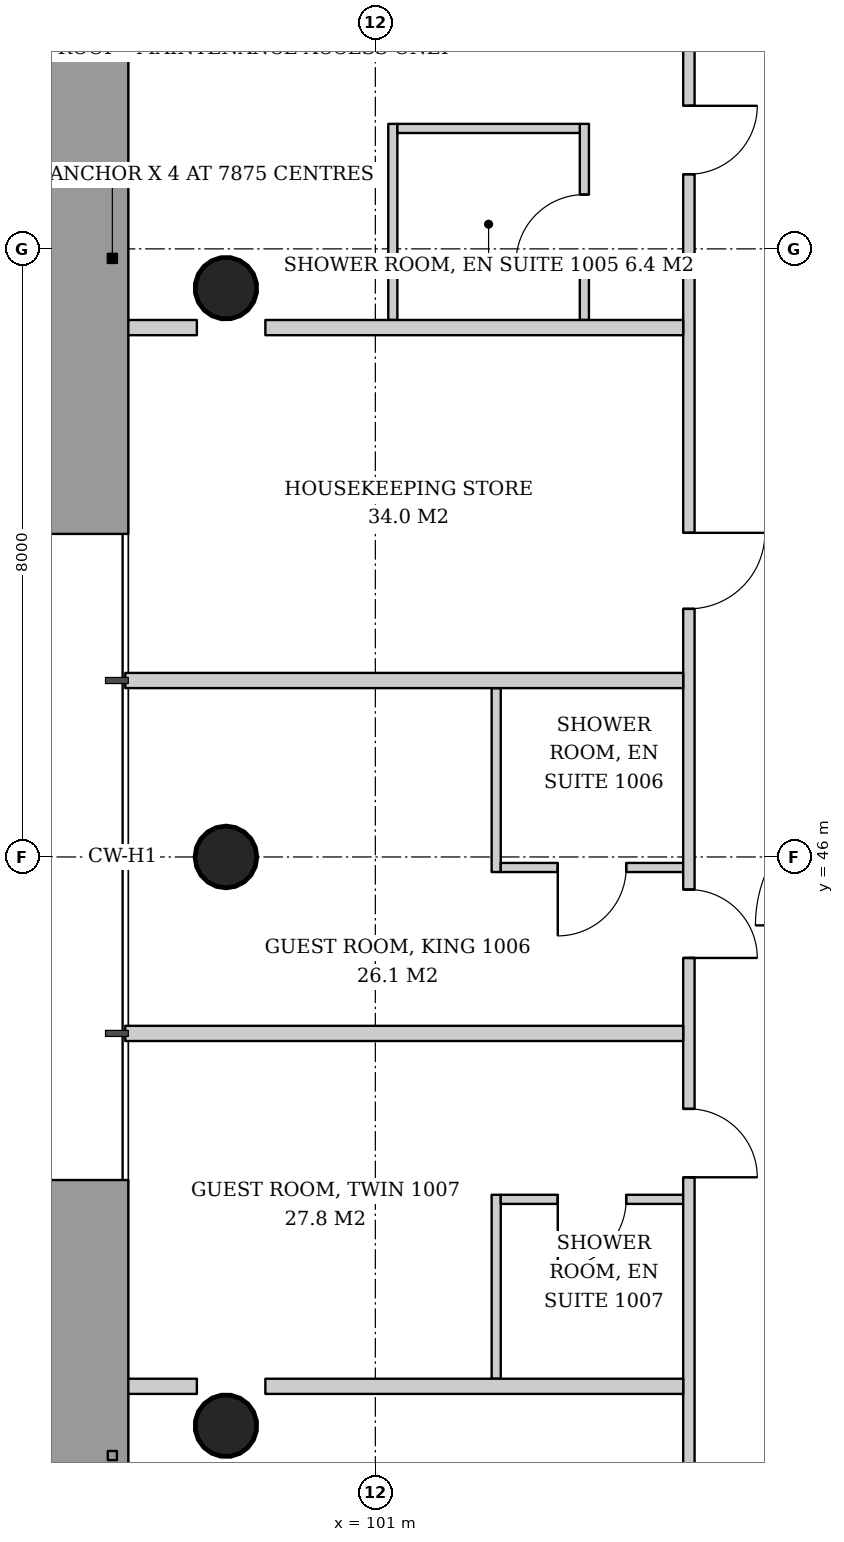
"""IFC4 building model, lengths in metres.
Left out: names, types, materials, properties, quantities, classifications, styles, units other than length and angle.
Written with IfcOpenShell. Run it as: python <this file> out.ifc"""

import sys

from ifc_helpers import new_model, si_unit, direction, frame, frame_2d, origin, origin_2d, place, context, subcontext, project, spatial, rectangle, hollow_circle, extrude, element, fill, save


model = new_model("IFC4")
c1 = context("Model", 3, precision=1e-05, world=origin(), true_north=direction((0.0, 1.0)))
c2 = subcontext(c1, "Body", "Model", "MODEL_VIEW")
j1 = project(units=[si_unit("LENGTHUNIT", "METRE"), si_unit("PLANEANGLEUNIT", "RADIAN")], contexts=[c1])
p1 = place(None, origin())
s1 = spatial("IfcSite", under=j1, at=p1, CompositionType="ELEMENT")
p2 = place(p1, origin())
s2 = spatial("IfcBuilding", under=s1, at=p2, CompositionType="ELEMENT")
p3 = place(p2, frame((0.0, 0.0, 43.8)))
s3 = spatial("IfcBuildingStorey", under=s2, at=p3, CompositionType="ELEMENT", Elevation=43.8)
p4 = place(p3, frame((98.983, 53.509, 0.0), z_axis=(0.043059584825, -0.021497706284, 0.998841188968), x_axis=(0.446680166538, 0.894693706707, 0.0)))
e1 = element("IfcColumn", 1, at=p4, inside=s3, PredefinedType="COLUMN", context=c2, shape_type="SweptSolid", body=[
    extrude(hollow_circle(Radius=0.406, WallThickness=0.03, at=origin_2d()), origin(), (0.0, 0.0, 1.0), 3.804),
])
p5 = place(p3, frame((98.983, 46.0, 0.0), z_axis=(0.043069538298, 0.0, 0.999072076915), x_axis=(0.0, 1.0, 0.0)))
e2 = element("IfcColumn", 2, at=p5, inside=s3, PredefinedType="COLUMN", context=c2, shape_type="SweptSolid", body=[
    extrude(hollow_circle(Radius=0.406, WallThickness=0.03, at=origin_2d()), origin(), (0.0, 0.0, 1.0), 3.803),
])
p6 = place(p3, frame((98.983, 38.491, 0.0), z_axis=(0.043059584825, 0.021497706284, 0.998841188968), x_axis=(-0.446680166538, 0.894693706707, 0.0)))
e3 = element("IfcColumn", 3, at=p6, inside=s3, PredefinedType="COLUMN", context=c2, shape_type="SweptSolid", body=[
    extrude(hollow_circle(Radius=0.406, WallThickness=0.03, at=origin_2d()), origin(), (0.0, 0.0, 1.0), 3.804),
])
p7 = place(p3, frame((103.75, 53.064, 0.0), z_axis=(0.0, 0.0, 1.0), x_axis=(0.0, 1.0, 0.0)))
e4 = element("IfcWall", 4, at=p7, inside=s3, PredefinedType="PARTITIONING", context=c2, shape_type="SweptSolid", body=[
    extrude(rectangle(XDim=2.58, YDim=0.12, at=frame_2d((1.29, 0.0))), origin(), (0.0, 0.0, 1.0), 2.8),
])
p8 = place(p7, frame((0.75, 0.0, 0.0)))
e5 = element("IfcOpeningElement", 5, at=p8, cuts=e4, PredefinedType="OPENING", context=c2, shape_type="SweptSolid", body=[
    extrude(rectangle(XDim=0.9, YDim=2.1, at=frame_2d((0.45, 1.05))), frame((0.0, 0.07, 0.0), z_axis=(0.0, -1.0, 0.0), x_axis=(1.0, 0.0, 0.0)), (0.0, 0.0, 1.0), 0.14),
])
p9 = place(p3, frame((101.23, 53.064, 0.0), z_axis=(0.0, 0.0, 1.0), x_axis=(0.0, 1.0, 0.0)))
e6 = element("IfcWall", 6, at=p9, inside=s3, PredefinedType="PARTITIONING", context=c2, shape_type="SweptSolid", body=[
    extrude(rectangle(XDim=2.58, YDim=0.12, at=frame_2d((1.29, 0.0))), origin(), (0.0, 0.0, 1.0), 2.8),
])
p10 = place(p3, frame((103.69, 55.584, 0.0), z_axis=(0.0, 0.0, 1.0), x_axis=(-1.0, 0.0, 0.0)))
e7 = element("IfcWall", 7, at=p10, inside=s3, PredefinedType="PARTITIONING", context=c2, shape_type="SweptSolid", body=[
    extrude(rectangle(XDim=2.4, YDim=0.12, at=frame_2d((1.2, 0.0))), origin(), (0.0, 0.0, 1.0), 2.847),
])
p11 = place(p3, frame((102.59, 48.221, 0.0), z_axis=(0.0, 0.0, 1.0), x_axis=(0.0, -1.0, 0.0)))
e8 = element("IfcWall", 8, at=p11, inside=s3, PredefinedType="PARTITIONING", context=c2, shape_type="SweptSolid", body=[
    extrude(rectangle(XDim=2.42, YDim=0.12, at=frame_2d((1.21, 0.0))), origin(), (0.0, 0.0, 1.0), 2.847),
])
p12 = place(p3, frame((105.05, 45.861, 0.0), z_axis=(0.0, 0.0, 1.0), x_axis=(-1.0, 0.0, 0.0)))
e9 = element("IfcWall", 9, at=p12, inside=s3, PredefinedType="PARTITIONING", context=c2, shape_type="SweptSolid", body=[
    extrude(rectangle(XDim=2.4, YDim=0.12, at=frame_2d((1.2, 0.0))), origin(), (0.0, 0.0, 1.0), 3.6),
])
p13 = place(p12, frame((0.75, 0.0, 0.0)))
e10 = element("IfcOpeningElement", 10, at=p13, cuts=e9, PredefinedType="OPENING", context=c2, shape_type="SweptSolid", body=[
    extrude(rectangle(XDim=0.9, YDim=2.1, at=frame_2d((0.45, 1.05))), frame((0.0, 0.07, 0.0), z_axis=(0.0, -1.0, 0.0), x_axis=(1.0, 0.0, 0.0)), (0.0, 0.0, 1.0), 0.14),
])
p14 = place(p3, frame((102.59, 41.556, 0.0), z_axis=(0.0, 0.0, 1.0), x_axis=(0.0, -1.0, 0.0)))
e11 = element("IfcWall", 11, at=p14, inside=s3, PredefinedType="PARTITIONING", context=c2, shape_type="SweptSolid", body=[
    extrude(rectangle(XDim=2.42, YDim=0.12, at=frame_2d((1.21, 0.0))), origin(), (0.0, 0.0, 1.0), 2.847),
])
p15 = place(p3, frame((105.05, 41.496, 0.0), z_axis=(0.0, 0.0, 1.0), x_axis=(-1.0, 0.0, 0.0)))
e12 = element("IfcWall", 12, at=p15, inside=s3, PredefinedType="PARTITIONING", context=c2, shape_type="SweptSolid", body=[
    extrude(rectangle(XDim=2.4, YDim=0.12, at=frame_2d((1.2, 0.0))), origin(), (0.0, 0.0, 1.0), 2.847),
])
p16 = place(p15, frame((0.75, 0.0, 0.0)))
e13 = element("IfcOpeningElement", 13, at=p16, cuts=e12, PredefinedType="OPENING", context=c2, shape_type="SweptSolid", body=[
    extrude(rectangle(XDim=0.9, YDim=2.1, at=frame_2d((0.45, 1.05))), frame((0.0, 0.07, 0.0), z_axis=(0.0, -1.0, 0.0), x_axis=(1.0, 0.0, 0.0)), (0.0, 0.0, 1.0), 0.14),
])
p17 = place(p3, frame((105.125, 57.95, 0.0), z_axis=(0.0, 0.0, 1.0), x_axis=(0.0, -1.0, 0.0)))
e14 = element("IfcWall", 14, at=p17, inside=s3, PredefinedType="PARTITIONING", context=c2, shape_type="SweptSolid", body=[
    extrude(rectangle(XDim=23.75, YDim=0.15, at=frame_2d((11.875, 0.0))), origin(), (0.0, 0.0, 1.0), 2.8),
])
p18 = place(p17, frame((2.068, 0.0, 0.0)))
e15 = element("IfcOpeningElement", 15, at=p18, cuts=e14, PredefinedType="OPENING", context=c2, shape_type="SweptSolid", body=[
    extrude(rectangle(XDim=0.9, YDim=2.1, at=frame_2d((0.45, 1.05))), frame((0.0, 0.085, 0.0), z_axis=(0.0, -1.0, 0.0), x_axis=(1.0, 0.0, 0.0)), (0.0, 0.0, 1.0), 0.17),
])
p19 = place(p17, frame((7.686, 0.0, 0.0)))
e16 = element("IfcOpeningElement", 16, at=p19, cuts=e14, PredefinedType="OPENING", context=c2, shape_type="SweptSolid", body=[
    extrude(rectangle(XDim=1.0, YDim=2.1, at=frame_2d((0.5, 1.05))), frame((0.0, 0.085, 0.0), z_axis=(0.0, -1.0, 0.0), x_axis=(1.0, 0.0, 0.0)), (0.0, 0.0, 1.0), 0.17),
])
p20 = place(p17, frame((12.379, 0.0, 0.0)))
e17 = element("IfcOpeningElement", 17, at=p20, cuts=e14, PredefinedType="OPENING", context=c2, shape_type="SweptSolid", body=[
    extrude(rectangle(XDim=0.9, YDim=2.1, at=frame_2d((0.45, 1.05))), frame((0.0, 0.085, 0.0), z_axis=(0.0, -1.0, 0.0), x_axis=(1.0, 0.0, 0.0)), (0.0, 0.0, 1.0), 0.17),
])
p21 = place(p17, frame((15.264, 0.0, 0.0)))
e18 = element("IfcOpeningElement", 18, at=p21, cuts=e14, PredefinedType="OPENING", context=c2, shape_type="SweptSolid", body=[
    extrude(rectangle(XDim=0.9, YDim=2.1, at=frame_2d((0.45, 1.05))), frame((0.0, 0.085, 0.0), z_axis=(0.0, -1.0, 0.0), x_axis=(1.0, 0.0, 0.0)), (0.0, 0.0, 1.0), 0.17),
])
p22 = place(p3, frame((105.05, 52.964, 0.0), z_axis=(0.0, 0.0, 1.0), x_axis=(-1.0, 0.0, 0.0)))
e19 = element("IfcWall", 19, at=p22, inside=s3, PredefinedType="PARTITIONING", context=c2, shape_type="SweptSolid", body=[
    extrude(rectangle(XDim=5.497, YDim=0.2, at=frame_2d((2.749, 0.0))), origin(), (0.0, 0.0, 1.0), 3.6),
])
p23 = place(p3, frame((98.652, 52.964, 0.0), z_axis=(0.0, 0.0, 1.0), x_axis=(-1.0, 0.0, 0.0)))
e20 = element("IfcWall", 20, at=p23, inside=s3, PredefinedType="PARTITIONING", context=c2, shape_type="SweptSolid", body=[
    extrude(rectangle(XDim=0.942, YDim=0.2, at=frame_2d((0.471, 0.0))), origin(), (0.0, 0.0, 1.0), 3.6),
])
for number, where, z_axis, x_axis in (
    (21, (105.05, 48.322, 0.0), (0.0, 0.0, 1.0), (-1.0, 0.0, 0.0)),
    (22, (105.05, 43.678, 0.0), (0.0, 0.0, 1.0), (-1.0, 0.0, 0.0)),
):
    element("IfcWall", number, at=place(p3, frame(where, z_axis=z_axis, x_axis=x_axis)), inside=s3, PredefinedType="PARTITIONING", context=c2, shape_type="SweptSolid", body=[
        extrude(rectangle(XDim=7.34, YDim=0.2, at=frame_2d((3.67, 0.0))), origin(), (0.0, 0.0, 1.0), 3.05),
    ])
p24 = place(p3, frame((105.05, 39.036, 0.0), z_axis=(0.0, 0.0, 1.0), x_axis=(-1.0, 0.0, 0.0)))
e23 = element("IfcWall", 23, at=p24, inside=s3, PredefinedType="PARTITIONING", context=c2, shape_type="SweptSolid", body=[
    extrude(rectangle(XDim=5.497, YDim=0.2, at=frame_2d((2.749, 0.0))), origin(), (0.0, 0.0, 1.0), 3.6),
])
p25 = place(p3, frame((98.652, 39.036, 0.0), z_axis=(0.0, 0.0, 1.0), x_axis=(-1.0, 0.0, 0.0)))
e24 = element("IfcWall", 24, at=p25, inside=s3, PredefinedType="PARTITIONING", context=c2, shape_type="SweptSolid", body=[
    extrude(rectangle(XDim=0.942, YDim=0.2, at=frame_2d((0.471, 0.0))), origin(), (0.0, 0.0, 1.0), 3.6),
])
p26 = place(p8, origin())
e25 = element("IfcDoor", 25, at=p26, inside=s3, OperationType="SINGLE_SWING_LEFT", PredefinedType="DOOR", context=c2, shape_type="SweptSolid", body=[
    extrude(rectangle(XDim=0.9, YDim=2.1, at=frame_2d((0.45, 1.05))), frame((0.0, 0.025, 0.0), z_axis=(0.0, -1.0, 0.0), x_axis=(1.0, 0.0, 0.0)), (0.0, 0.0, 1.0), 0.05),
])
fill(e5, e25)
p27 = place(p13, origin())
e26 = element("IfcDoor", 26, at=p27, inside=s3, OperationType="SINGLE_SWING_RIGHT", PredefinedType="DOOR", context=c2, shape_type="SweptSolid", body=[
    extrude(rectangle(XDim=0.9, YDim=2.1, at=frame_2d((0.45, 1.05))), frame((0.0, 0.025, 0.0), z_axis=(0.0, -1.0, 0.0), x_axis=(1.0, 0.0, 0.0)), (0.0, 0.0, 1.0), 0.05),
])
fill(e10, e26)
p28 = place(p16, origin())
e27 = element("IfcDoor", 27, at=p28, inside=s3, OperationType="SINGLE_SWING_RIGHT", PredefinedType="DOOR", context=c2, shape_type="SweptSolid", body=[
    extrude(rectangle(XDim=0.9, YDim=2.1, at=frame_2d((0.45, 1.05))), frame((0.0, 0.025, 0.0), z_axis=(0.0, -1.0, 0.0), x_axis=(1.0, 0.0, 0.0)), (0.0, 0.0, 1.0), 0.05),
])
fill(e13, e27)
p29 = place(p18, origin())
e28 = element("IfcDoor", 28, at=p29, inside=s3, OperationType="SINGLE_SWING_LEFT", PredefinedType="DOOR", context=c2, shape_type="SweptSolid", body=[
    extrude(rectangle(XDim=0.9, YDim=2.1, at=frame_2d((0.45, 1.05))), frame((0.0, 0.025, 0.0), z_axis=(0.0, -1.0, 0.0), x_axis=(1.0, 0.0, 0.0)), (0.0, 0.0, 1.0), 0.05),
])
fill(e15, e28)
p30 = place(p19, origin())
e29 = element("IfcDoor", 29, at=p30, inside=s3, OperationType="SINGLE_SWING_LEFT", PredefinedType="DOOR", context=c2, shape_type="SweptSolid", body=[
    extrude(rectangle(XDim=1.0, YDim=2.1, at=frame_2d((0.5, 1.05))), frame((0.0, 0.025, 0.0), z_axis=(0.0, -1.0, 0.0), x_axis=(1.0, 0.0, 0.0)), (0.0, 0.0, 1.0), 0.05),
])
fill(e16, e29)
p31 = place(p20, origin())
e30 = element("IfcDoor", 30, at=p31, inside=s3, OperationType="SINGLE_SWING_RIGHT", PredefinedType="DOOR", context=c2, shape_type="SweptSolid", body=[
    extrude(rectangle(XDim=0.9, YDim=2.1, at=frame_2d((0.45, 1.05))), frame((0.0, 0.025, 0.0), z_axis=(0.0, -1.0, 0.0), x_axis=(1.0, 0.0, 0.0)), (0.0, 0.0, 1.0), 0.05),
])
fill(e17, e30)
p32 = place(p21, origin())
e31 = element("IfcDoor", 31, at=p32, inside=s3, OperationType="SINGLE_SWING_RIGHT", PredefinedType="DOOR", context=c2, shape_type="SweptSolid", body=[
    extrude(rectangle(XDim=0.9, YDim=2.1, at=frame_2d((0.45, 1.05))), frame((0.0, 0.025, 0.0), z_axis=(0.0, -1.0, 0.0), x_axis=(1.0, 0.0, 0.0)), (0.0, 0.0, 1.0), 0.05),
])
fill(e18, e31)
save(model, sys.argv[1])
